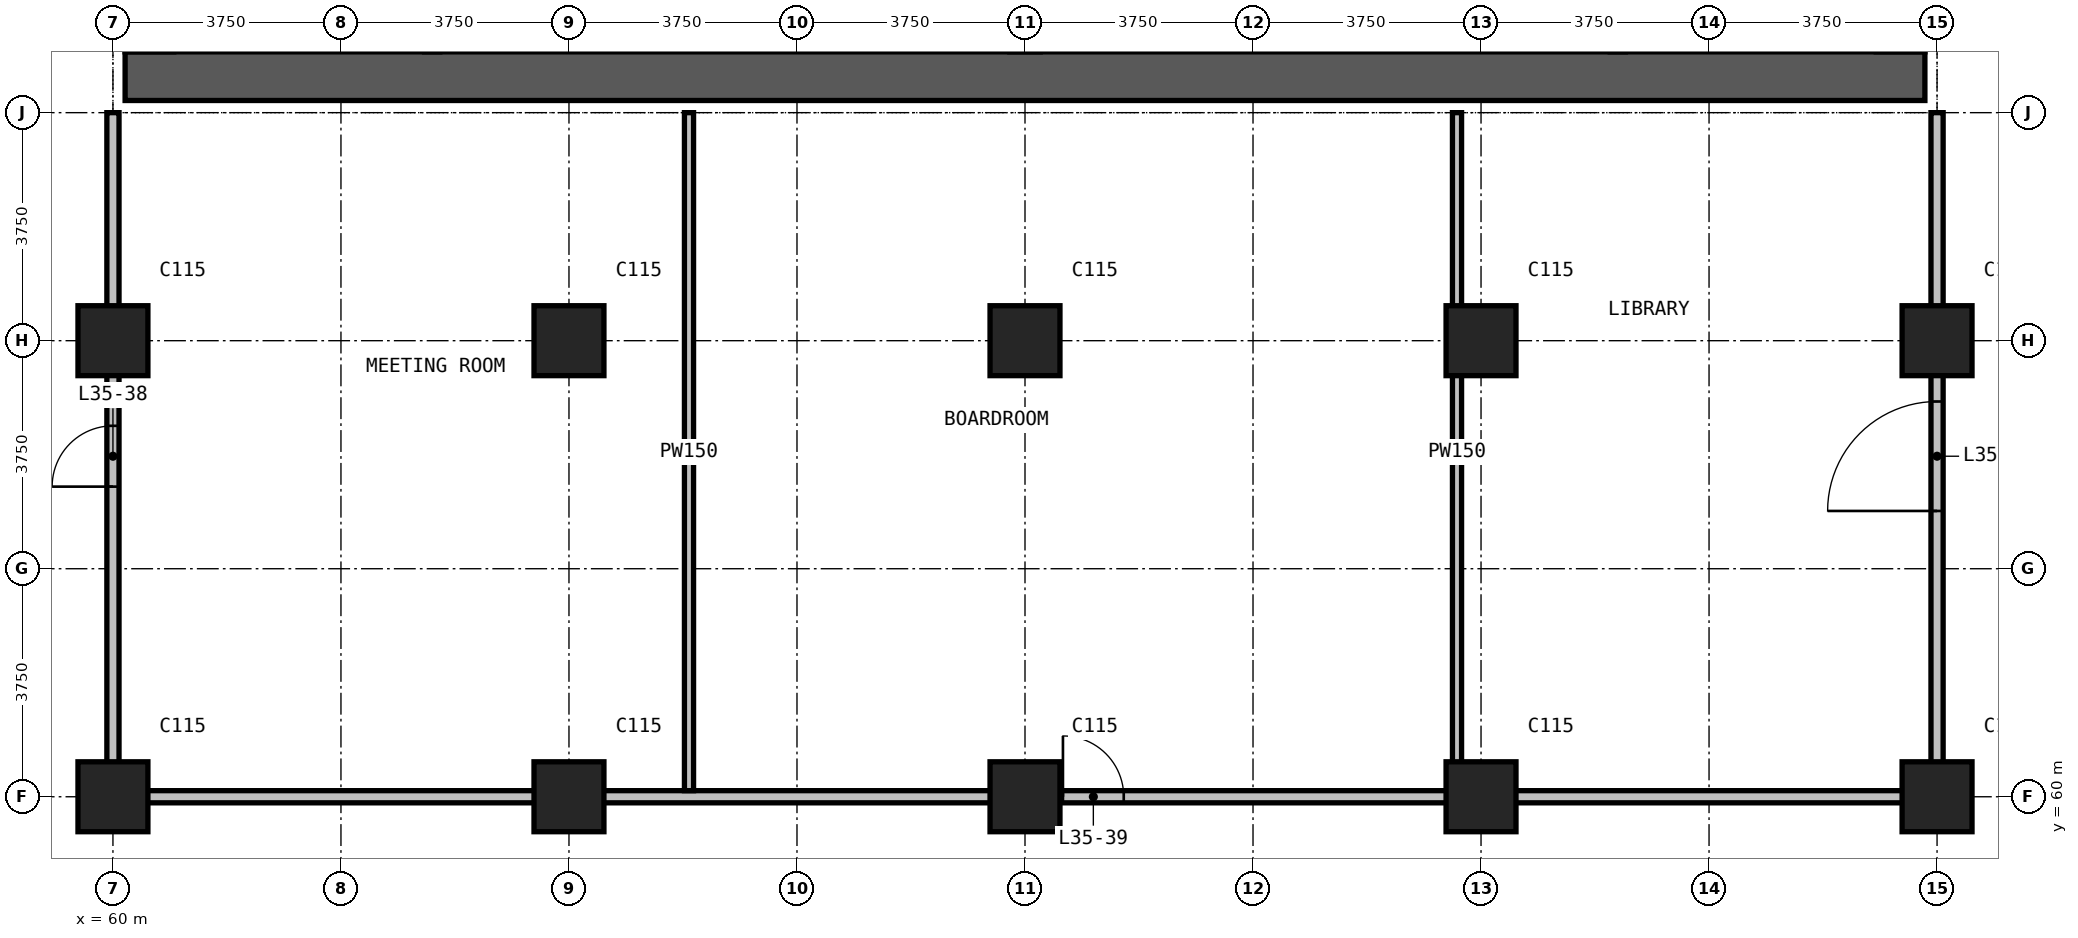
"""IFC4 building model, lengths in metres.
Left out: names, types, materials, properties, quantities, classifications, styles, units other than length and angle.
Written with IfcOpenShell. Run it as: python <this file> out.ifc"""

import sys

from ifc_helpers import new_model, si_unit, direction, frame, frame_2d, origin, origin_2d, place, context, subcontext, project, spatial, rectangle, extrude, element, fill, save


model = new_model("IFC4")
c1 = context("Model", 3, precision=1e-05, world=origin(), true_north=direction((0.0, 1.0)))
c2 = subcontext(c1, "Body", "Model", "MODEL_VIEW")
j1 = project(units=[si_unit("LENGTHUNIT", "METRE"), si_unit("PLANEANGLEUNIT", "RADIAN")], contexts=[c1])
p1 = place(None, origin())
s1 = spatial("IfcSite", under=j1, at=p1, CompositionType="ELEMENT")
p2 = place(p1, origin())
s2 = spatial("IfcBuilding", under=s1, at=p2, CompositionType="ELEMENT")
p3 = place(p2, frame((0.0, 0.0, 139.6)))
s3 = spatial("IfcBuildingStorey", under=s2, at=p3, CompositionType="ELEMENT", Elevation=139.6)
for number, where, z_axis, x_axis in (
    (1, (60.0, 60.0, 0.0), (0.0, 0.0, 1.0), (1.0, 0.0, 0.0)),
    (2, (60.0, 67.5, 0.0), (0.0, 0.0, 1.0), (1.0, 0.0, 0.0)),
    (3, (67.5, 60.0, 0.0), (0.0, 0.0, 1.0), (1.0, 0.0, 0.0)),
    (4, (67.5, 67.5, 0.0), (0.0, 0.0, 1.0), (1.0, 0.0, 0.0)),
    (5, (75.0, 60.0, 0.0), (0.0, 0.0, 1.0), (1.0, 0.0, 0.0)),
    (6, (75.0, 67.5, 0.0), (0.0, 0.0, 1.0), (1.0, 0.0, 0.0)),
    (7, (82.5, 60.0, 0.0), (0.0, 0.0, 1.0), (1.0, 0.0, 0.0)),
    (8, (82.5, 67.5, 0.0), (0.0, 0.0, 1.0), (1.0, 0.0, 0.0)),
    (9, (90.0, 60.0, 0.0), (0.0, 0.0, 1.0), (1.0, 0.0, 0.0)),
    (10, (90.0, 67.5, 0.0), (0.0, 0.0, 1.0), (1.0, 0.0, 0.0)),
):
    element("IfcColumn", number, at=place(p3, frame(where, z_axis=z_axis, x_axis=x_axis)), inside=s3, PredefinedType="COLUMN", context=c2, shape_type="SweptSolid", body=[
        extrude(rectangle(XDim=1.15, YDim=1.15, at=origin_2d()), origin(), (0.0, 0.0, 1.0), 3.6),
    ])
p4 = place(p3, frame((60.2, 71.85, 0.0), z_axis=(0.0, 0.0, 1.0), x_axis=(1.0, 0.0, 0.0)))
e11 = element("IfcWall", 11, at=p4, inside=s3, PredefinedType="SHEAR", context=c2, shape_type="SweptSolid", body=[
    extrude(rectangle(XDim=29.6, YDim=0.8, at=frame_2d((14.8, 0.0))), origin(), (0.0, 0.0, 1.0), 3.6),
])
p5 = place(p3, frame((60.1, 60.0, 0.0), z_axis=(0.0, 0.0, 1.0), x_axis=(1.0, 0.0, 0.0)))
e12 = element("IfcWall", 12, at=p5, inside=s3, PredefinedType="PARTITIONING", context=c2, shape_type="SweptSolid", body=[
    extrude(rectangle(XDim=29.8, YDim=0.2, at=frame_2d((14.9, 0.0))), origin(), (0.0, 0.0, 1.0), 3.3),
])
p6 = place(p5, frame((15.524, 0.0, 0.0)))
e13 = element("IfcOpeningElement", 13, at=p6, cuts=e12, PredefinedType="OPENING", context=c2, shape_type="SweptSolid", body=[
    extrude(rectangle(XDim=1.0, YDim=2.2, at=frame_2d((0.5, 1.1))), frame((0.0, 0.11, 0.0), z_axis=(0.0, -1.0, 0.0), x_axis=(1.0, 0.0, 0.0)), (0.0, 0.0, 1.0), 0.22),
])
p7 = place(p3, frame((60.0, 59.9, 0.0), z_axis=(0.0, 0.0, 1.0), x_axis=(0.0, 1.0, 0.0)))
e14 = element("IfcWall", 14, at=p7, inside=s3, PredefinedType="PARTITIONING", context=c2, shape_type="SweptSolid", body=[
    extrude(rectangle(XDim=11.35, YDim=0.2, at=frame_2d((5.675, 0.0))), origin(), (0.0, 0.0, 1.0), 3.3),
])
p8 = place(p7, frame((5.2, 0.0, 0.0)))
e15 = element("IfcOpeningElement", 15, at=p8, cuts=e14, PredefinedType="OPENING", context=c2, shape_type="SweptSolid", body=[
    extrude(rectangle(XDim=1.0, YDim=2.2, at=frame_2d((0.5, 1.1))), frame((0.0, 0.11, 0.0), z_axis=(0.0, -1.0, 0.0), x_axis=(1.0, 0.0, 0.0)), (0.0, 0.0, 1.0), 0.22),
])
p9 = place(p3, frame((90.0, 59.9, 0.0), z_axis=(0.0, 0.0, 1.0), x_axis=(0.0, 1.0, 0.0)))
e16 = element("IfcWall", 16, at=p9, inside=s3, PredefinedType="PARTITIONING", context=c2, shape_type="SweptSolid", body=[
    extrude(rectangle(XDim=11.35, YDim=0.2, at=frame_2d((5.675, 0.0))), origin(), (0.0, 0.0, 1.0), 3.3),
])
p10 = place(p9, frame((4.8, 0.0, 0.0)))
e17 = element("IfcOpeningElement", 17, at=p10, cuts=e16, PredefinedType="OPENING", context=c2, shape_type="SweptSolid", body=[
    extrude(rectangle(XDim=1.8, YDim=2.2, at=frame_2d((0.9, 1.1))), frame((0.0, 0.11, 0.0), z_axis=(0.0, -1.0, 0.0), x_axis=(1.0, 0.0, 0.0)), (0.0, 0.0, 1.0), 0.22),
])
for number, where, z_axis, x_axis in (
    (18, (69.474, 60.1, 0.0), (0.0, 0.0, 1.0), (0.0, 1.0, 0.0)),
    (19, (82.105, 60.1, 0.0), (0.0, 0.0, 1.0), (0.0, 1.0, 0.0)),
):
    element("IfcWall", number, at=place(p3, frame(where, z_axis=z_axis, x_axis=x_axis)), inside=s3, PredefinedType="PARTITIONING", context=c2, shape_type="SweptSolid", body=[
        extrude(rectangle(XDim=11.15, YDim=0.15, at=frame_2d((5.575, 0.0))), origin(), (0.0, 0.0, 1.0), 3.3),
    ])
p11 = place(p8, origin())
e20 = element("IfcDoor", 20, at=p11, inside=s3, OperationType="SINGLE_SWING_RIGHT", PredefinedType="DOOR", context=c2, shape_type="SweptSolid", body=[
    extrude(rectangle(XDim=1.0, YDim=2.2, at=frame_2d((0.5, 1.1))), frame((0.0, 0.025, 0.0), z_axis=(0.0, -1.0, 0.0), x_axis=(1.0, 0.0, 0.0)), (0.0, 0.0, 1.0), 0.05),
])
fill(e15, e20)
p12 = place(p6, origin())
e21 = element("IfcDoor", 21, at=p12, inside=s3, OperationType="SINGLE_SWING_LEFT", PredefinedType="DOOR", context=c2, shape_type="SweptSolid", body=[
    extrude(rectangle(XDim=1.0, YDim=2.2, at=frame_2d((0.5, 1.1))), frame((0.0, 0.025, 0.0), z_axis=(0.0, -1.0, 0.0), x_axis=(1.0, 0.0, 0.0)), (0.0, 0.0, 1.0), 0.05),
])
fill(e13, e21)
p13 = place(p10, origin())
e22 = element("IfcDoor", 22, at=p13, inside=s3, OperationType="DOUBLE_DOOR_SINGLE_SWING", PredefinedType="DOOR", context=c2, shape_type="SweptSolid", body=[
    extrude(rectangle(XDim=1.8, YDim=2.2, at=frame_2d((0.9, 1.1))), frame((0.0, 0.025, 0.0), z_axis=(0.0, -1.0, 0.0), x_axis=(1.0, 0.0, 0.0)), (0.0, 0.0, 1.0), 0.05),
])
fill(e17, e22)
save(model, sys.argv[1])
